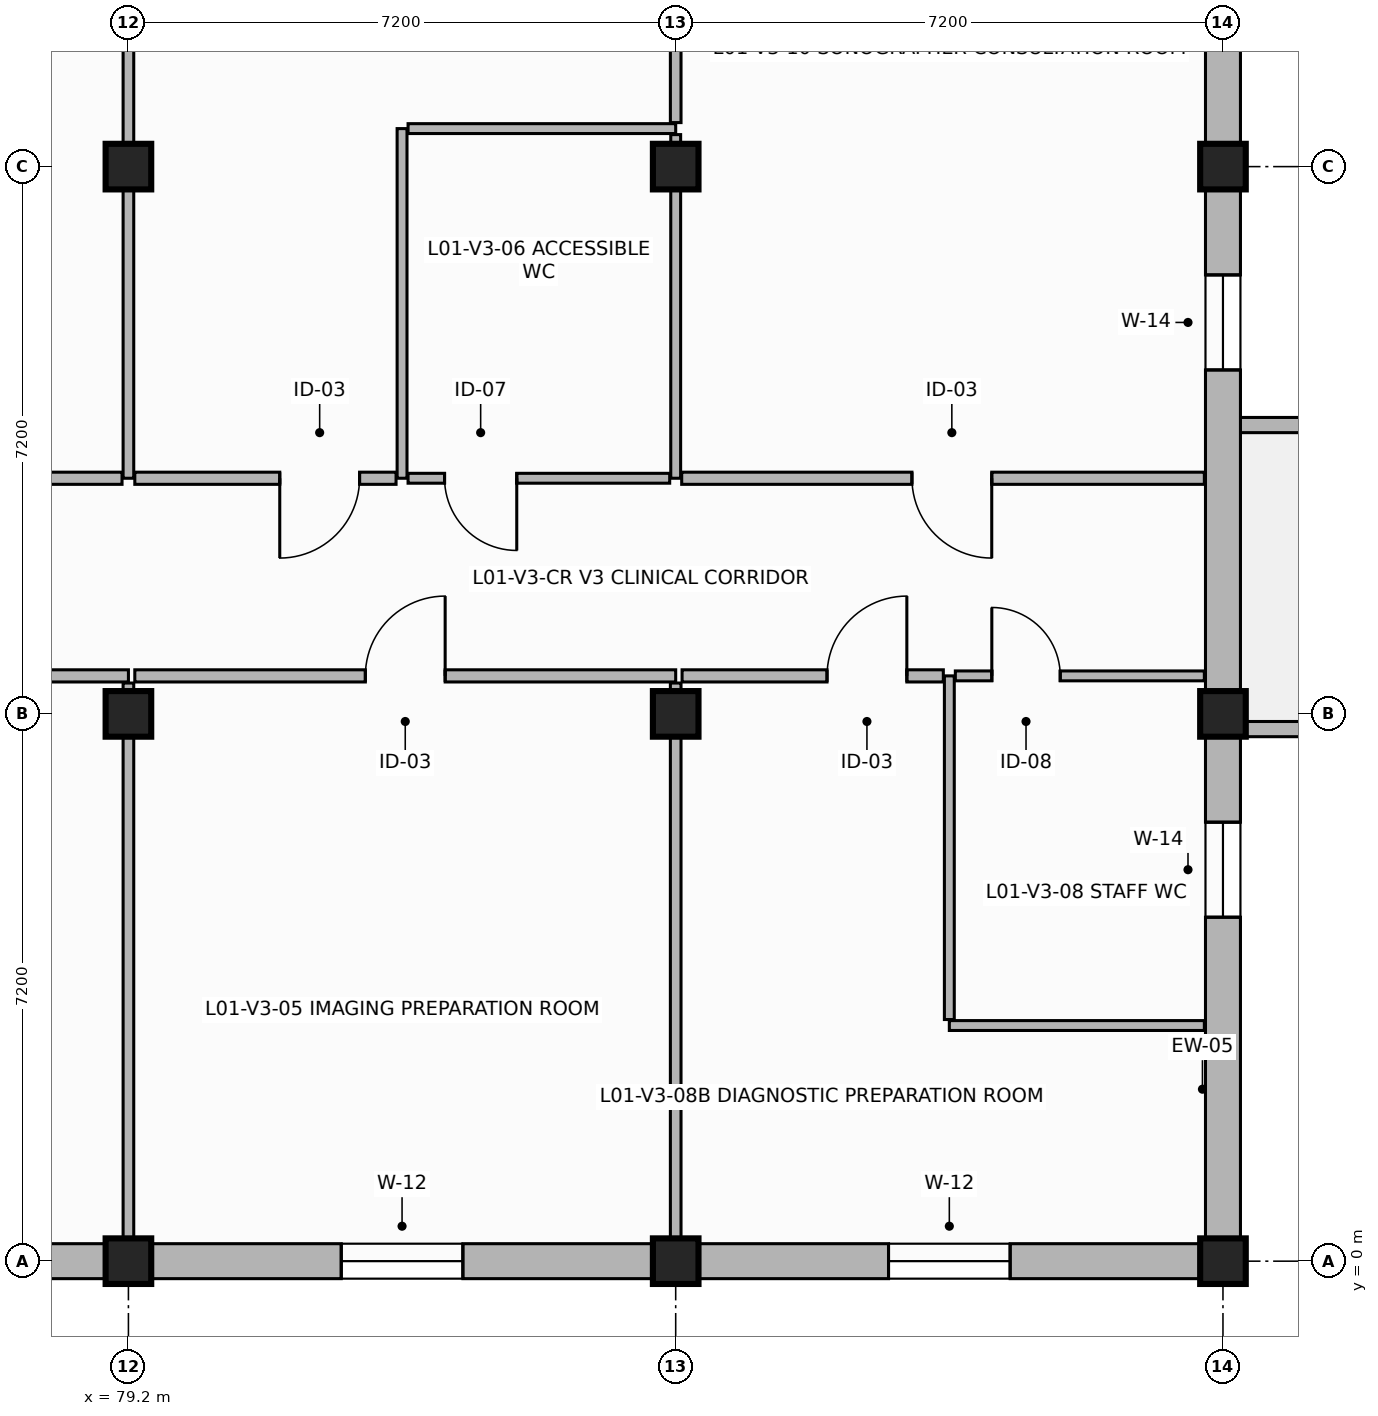
"""IFC4 building model, lengths in metres.
Left out: names, types, materials, properties, quantities, classifications, styles, units other than length and angle.
Written with IfcOpenShell. Run it as: python <this file> out.ifc"""

import sys

from ifc_helpers import new_model, si_unit, direction, frame, frame_2d, origin, origin_2d, place, context, subcontext, project, spatial, rectangle, extrude, element, fill, save


model = new_model("IFC4")
c1 = context("Model", 3, precision=1e-05, world=origin(), true_north=direction((0.0, 1.0)))
c2 = subcontext(c1, "Body", "Model", "MODEL_VIEW")
j1 = project(units=[si_unit("LENGTHUNIT", "METRE"), si_unit("PLANEANGLEUNIT", "RADIAN")], contexts=[c1])
p1 = place(None, origin())
s1 = spatial("IfcSite", under=j1, at=p1, CompositionType="ELEMENT")
p2 = place(p1, origin())
s2 = spatial("IfcBuilding", under=s1, at=p2, CompositionType="ELEMENT")
p3 = place(p2, frame((0.0, 0.0, 4.5)))
s3 = spatial("IfcBuildingStorey", under=s2, at=p3, CompositionType="ELEMENT", Elevation=4.5)
for number, where, z_axis, x_axis in (
    (1, (79.2, 0.0, 0.0), (0.0, 0.0, 1.0), (1.0, 0.0, 0.0)),
    (2, (79.2, 7.2, 0.0), (0.0, 0.0, 1.0), (1.0, 0.0, 0.0)),
    (3, (79.2, 14.4, 0.0), (0.0, 0.0, 1.0), (1.0, 0.0, 0.0)),
    (4, (86.4, 0.0, 0.0), (0.0, 0.0, 1.0), (1.0, 0.0, 0.0)),
    (5, (86.4, 7.2, 0.0), (0.0, 0.0, 1.0), (1.0, 0.0, 0.0)),
    (6, (86.4, 14.4, 0.0), (0.0, 0.0, 1.0), (1.0, 0.0, 0.0)),
    (7, (93.6, 0.0, 0.0), (0.0, 0.0, 1.0), (1.0, 0.0, 0.0)),
    (8, (93.6, 7.2, 0.0), (0.0, 0.0, 1.0), (1.0, 0.0, 0.0)),
    (9, (93.6, 14.4, 0.0), (0.0, 0.0, 1.0), (1.0, 0.0, 0.0)),
):
    element("IfcColumn", number, at=place(p3, frame(where, z_axis=z_axis, x_axis=x_axis)), inside=s3, PredefinedType="COLUMN", context=c2, shape_type="SweptSolid", body=[
        extrude(rectangle(XDim=0.6, YDim=0.6, at=origin_2d()), origin(), (0.0, 0.0, 1.0), 3.55),
    ])
for number, where, z_axis, x_axis in (
    (10, (93.72, 7.0, 0.0), (0.0, 0.0, 1.0), (1.0, 0.0, 0.0)),
    (11, (122.28, 11.0, 0.0), (0.0, 0.0, 1.0), (-1.0, 0.0, 0.0)),
):
    element("IfcWall", number, at=place(p3, frame(where, z_axis=z_axis, x_axis=x_axis)), inside=s3, PredefinedType="PARAPET", context=c2, shape_type="SweptSolid", body=[
        extrude(rectangle(XDim=28.56, YDim=0.2, at=frame_2d((14.28, 0.0))), origin(), (0.0, 0.0, 1.0), 0.95),
    ])
p4 = place(p3, frame((72.0, 0.0, 0.0), z_axis=(0.0, 0.0, 1.0), x_axis=(1.0, 0.0, 0.0)))
e12 = element("IfcWall", 12, at=p4, inside=s3, PredefinedType="SOLIDWALL", context=c2, shape_type="SweptSolid", body=[
    extrude(rectangle(XDim=7.2, YDim=0.46, at=frame_2d((3.6, 0.0))), origin(), (0.0, 0.0, 1.0), 2.83),
])
p5 = place(p4, frame((2.8, 0.0, 1.2)))
e13 = element("IfcOpeningElement", 13, at=p5, cuts=e12, PredefinedType="OPENING", context=c2, shape_type="SweptSolid", body=[
    extrude(rectangle(XDim=1.6, YDim=1.4, at=frame_2d((0.8, 0.7))), frame((0.0, 0.24, 0.0), z_axis=(0.0, -1.0, 0.0), x_axis=(1.0, 0.0, 0.0)), (0.0, 0.0, 1.0), 0.48),
])
p6 = place(p3, frame((79.2, 0.0, 0.0), z_axis=(0.0, 0.0, 1.0), x_axis=(1.0, 0.0, 0.0)))
e14 = element("IfcWall", 14, at=p6, inside=s3, PredefinedType="SOLIDWALL", context=c2, shape_type="SweptSolid", body=[
    extrude(rectangle(XDim=7.2, YDim=0.46, at=frame_2d((3.6, 0.0))), origin(), (0.0, 0.0, 1.0), 2.83),
])
p7 = place(p6, frame((2.8, 0.0, 1.2)))
e15 = element("IfcOpeningElement", 15, at=p7, cuts=e14, PredefinedType="OPENING", context=c2, shape_type="SweptSolid", body=[
    extrude(rectangle(XDim=1.6, YDim=1.4, at=frame_2d((0.8, 0.7))), frame((0.0, 0.24, 0.0), z_axis=(0.0, -1.0, 0.0), x_axis=(1.0, 0.0, 0.0)), (0.0, 0.0, 1.0), 0.48),
])
p8 = place(p3, frame((86.4, 0.0, 0.0), z_axis=(0.0, 0.0, 1.0), x_axis=(1.0, 0.0, 0.0)))
e16 = element("IfcWall", 16, at=p8, inside=s3, PredefinedType="SOLIDWALL", context=c2, shape_type="SweptSolid", body=[
    extrude(rectangle(XDim=7.2, YDim=0.46, at=frame_2d((3.6, 0.0))), origin(), (0.0, 0.0, 1.0), 2.83),
])
p9 = place(p8, frame((2.8, 0.0, 1.2)))
e17 = element("IfcOpeningElement", 17, at=p9, cuts=e16, PredefinedType="OPENING", context=c2, shape_type="SweptSolid", body=[
    extrude(rectangle(XDim=1.6, YDim=1.4, at=frame_2d((0.8, 0.7))), frame((0.0, 0.24, 0.0), z_axis=(0.0, -1.0, 0.0), x_axis=(1.0, 0.0, 0.0)), (0.0, 0.0, 1.0), 0.48),
])
p10 = place(p3, frame((93.6, 0.0, 0.0), z_axis=(0.0, 0.0, 1.0), x_axis=(0.0, 1.0, 0.0)))
e18 = element("IfcWall", 18, at=p10, inside=s3, PredefinedType="SOLIDWALL", context=c2, shape_type="SweptSolid", body=[
    extrude(rectangle(XDim=7.2, YDim=0.46, at=frame_2d((3.6, 0.0))), origin(), (0.0, 0.0, 1.0), 2.83),
])
p11 = place(p10, frame((4.525, 0.0, 1.2)))
e19 = element("IfcOpeningElement", 19, at=p11, cuts=e18, PredefinedType="OPENING", context=c2, shape_type="SweptSolid", body=[
    extrude(rectangle(XDim=1.25, YDim=1.35, at=frame_2d((0.625, 0.675))), frame((0.0, 0.24, 0.0), z_axis=(0.0, -1.0, 0.0), x_axis=(1.0, 0.0, 0.0)), (0.0, 0.0, 1.0), 0.48),
])
p12 = place(p3, frame((93.6, 7.2, 0.0), z_axis=(0.0, 0.0, 1.0), x_axis=(0.0, 1.0, 0.0)))
e20 = element("IfcWall", 20, at=p12, inside=s3, PredefinedType="SOLIDWALL", context=c2, shape_type="SweptSolid", body=[
    extrude(rectangle(XDim=7.2, YDim=0.46, at=frame_2d((3.6, 0.0))), origin(), (0.0, 0.0, 1.0), 2.83),
])
p13 = place(p12, frame((4.525, 0.0, 1.2)))
e21 = element("IfcOpeningElement", 21, at=p13, cuts=e20, PredefinedType="OPENING", context=c2, shape_type="SweptSolid", body=[
    extrude(rectangle(XDim=1.25, YDim=1.35, at=frame_2d((0.625, 0.675))), frame((0.0, 0.24, 0.0), z_axis=(0.0, -1.0, 0.0), x_axis=(1.0, 0.0, 0.0)), (0.0, 0.0, 1.0), 0.48),
])
p14 = place(p3, frame((93.6, 14.4, 0.0), z_axis=(0.0, 0.0, 1.0), x_axis=(0.0, 1.0, 0.0)))
e22 = element("IfcWall", 22, at=p14, inside=s3, PredefinedType="SOLIDWALL", context=c2, shape_type="SweptSolid", body=[
    extrude(rectangle(XDim=7.2, YDim=0.46, at=frame_2d((3.6, 0.0))), origin(), (0.0, 0.0, 1.0), 2.83),
])
p15 = place(p14, frame((2.975, 0.0, 1.2)))
e23 = element("IfcOpeningElement", 23, at=p15, cuts=e22, PredefinedType="OPENING", context=c2, shape_type="SweptSolid", body=[
    extrude(rectangle(XDim=1.25, YDim=1.35, at=frame_2d((0.625, 0.675))), frame((0.0, 0.24, 0.0), z_axis=(0.0, -1.0, 0.0), x_axis=(1.0, 0.0, 0.0)), (0.0, 0.0, 1.0), 0.48),
])
p16 = place(p3, frame((64.929, 7.7, 0.0), z_axis=(0.0, 0.0, 1.0), x_axis=(1.0, 0.0, 0.0)))
e24 = element("IfcWall", 24, at=p16, inside=s3, PredefinedType="PARTITIONING", context=c2, shape_type="SweptSolid", body=[
    extrude(rectangle(XDim=14.271, YDim=0.16, at=frame_2d((7.135, 0.0))), origin(), (0.0, 0.0, 1.0), 2.81),
])
p17 = place(p16, frame((10.136, 0.0, 0.0)))
e25 = element("IfcOpeningElement", 25, at=p17, cuts=e24, PredefinedType="OPENING", context=c2, shape_type="SweptSolid", body=[
    extrude(rectangle(XDim=1.0, YDim=2.15, at=frame_2d((0.5, 1.075))), frame((0.0, 0.09, 0.0), z_axis=(0.0, -1.0, 0.0), x_axis=(1.0, 0.0, 0.0)), (0.0, 0.0, 1.0), 0.18),
])
p18 = place(p3, frame((79.2, 7.606, 0.0), z_axis=(0.0, 0.0, 1.0), x_axis=(0.0, -1.0, 0.0)))
e26 = element("IfcWall", 26, at=p18, inside=s3, PredefinedType="PARTITIONING", context=c2, shape_type="SweptSolid", body=[
    extrude(rectangle(XDim=7.361, YDim=0.14, at=frame_2d((3.68, 0.0))), origin(), (0.0, 0.0, 1.0), 2.81),
])
p19 = place(p3, frame((79.2, 21.355, 0.0), z_axis=(0.0, 0.0, 1.0), x_axis=(0.0, -1.0, 0.0)))
e27 = element("IfcWall", 27, at=p19, inside=s3, PredefinedType="PARTITIONING", context=c2, shape_type="SweptSolid", body=[
    extrude(rectangle(XDim=11.055, YDim=0.14, at=frame_2d((5.527, 0.0))), origin(), (0.0, 0.0, 1.0), 2.81),
])
p20 = place(p3, frame((79.116, 10.3, 0.0), z_axis=(0.0, 0.0, 1.0), x_axis=(-1.0, 0.0, 0.0)))
e28 = element("IfcWall", 28, at=p20, inside=s3, PredefinedType="PARTITIONING", context=c2, shape_type="SweptSolid", body=[
    extrude(rectangle(XDim=14.316, YDim=0.16, at=frame_2d((7.158, 0.0))), origin(), (0.0, 0.0, 1.0), 2.81),
])
p21 = place(p20, frame((10.171, 0.0, 0.0)))
e29 = element("IfcOpeningElement", 29, at=p21, cuts=e28, PredefinedType="OPENING", context=c2, shape_type="SweptSolid", body=[
    extrude(rectangle(XDim=1.0, YDim=2.15, at=frame_2d((0.5, 1.075))), frame((0.0, 0.09, 0.0), z_axis=(0.0, -1.0, 0.0), x_axis=(1.0, 0.0, 0.0)), (0.0, 0.0, 1.0), 0.18),
])
p22 = place(p3, frame((79.284, 7.7, 0.0), z_axis=(0.0, 0.0, 1.0), x_axis=(1.0, 0.0, 0.0)))
e30 = element("IfcWall", 30, at=p22, inside=s3, PredefinedType="PARTITIONING", context=c2, shape_type="SweptSolid", body=[
    extrude(rectangle(XDim=7.116, YDim=0.16, at=frame_2d((3.558, 0.0))), origin(), (0.0, 0.0, 1.0), 2.81),
])
p23 = place(p22, frame((3.033, 0.0, 0.0)))
e31 = element("IfcOpeningElement", 31, at=p23, cuts=e30, PredefinedType="OPENING", context=c2, shape_type="SweptSolid", body=[
    extrude(rectangle(XDim=1.05, YDim=2.15, at=frame_2d((0.525, 1.075))), frame((0.0, 0.09, 0.0), z_axis=(0.0, -1.0, 0.0), x_axis=(1.0, 0.0, 0.0)), (0.0, 0.0, 1.0), 0.18),
])
p24 = place(p3, frame((86.4, 7.606, 0.0), z_axis=(0.0, 0.0, 1.0), x_axis=(0.0, -1.0, 0.0)))
e32 = element("IfcWall", 32, at=p24, inside=s3, PredefinedType="PARTITIONING", context=c2, shape_type="SweptSolid", body=[
    extrude(rectangle(XDim=7.361, YDim=0.14, at=frame_2d((3.68, 0.0))), origin(), (0.0, 0.0, 1.0), 2.81),
])
p25 = place(p3, frame((82.8, 10.3, 0.0), z_axis=(0.0, 0.0, 1.0), x_axis=(0.0, 1.0, 0.0)))
e33 = element("IfcWall", 33, at=p25, inside=s3, PredefinedType="PARTITIONING", context=c2, shape_type="SweptSolid", body=[
    extrude(rectangle(XDim=4.6, YDim=0.13, at=frame_2d((2.3, 0.0))), origin(), (0.0, 0.0, 1.0), 2.81),
])
p26 = place(p3, frame((82.879, 14.9, 0.0), z_axis=(0.0, 0.0, 1.0), x_axis=(1.0, 0.0, 0.0)))
e34 = element("IfcWall", 34, at=p26, inside=s3, PredefinedType="PARTITIONING", context=c2, shape_type="SweptSolid", body=[
    extrude(rectangle(XDim=3.521, YDim=0.13, at=frame_2d((1.76, 0.0))), origin(), (0.0, 0.0, 1.0), 2.81),
])
p27 = place(p3, frame((86.4, 14.821, 0.0), z_axis=(0.0, 0.0, 1.0), x_axis=(0.0, -1.0, 0.0)))
e35 = element("IfcWall", 35, at=p27, inside=s3, PredefinedType="PARTITIONING", context=c2, shape_type="SweptSolid", body=[
    extrude(rectangle(XDim=4.521, YDim=0.13, at=frame_2d((2.26, 0.0))), origin(), (0.0, 0.0, 1.0), 2.81),
])
p28 = place(p3, frame((86.321, 10.3, 0.0), z_axis=(0.0, 0.0, 1.0), x_axis=(-1.0, 0.0, 0.0)))
e36 = element("IfcWall", 36, at=p28, inside=s3, PredefinedType="PARTITIONING", context=c2, shape_type="SweptSolid", body=[
    extrude(rectangle(XDim=3.442, YDim=0.13, at=frame_2d((1.721, 0.0))), origin(), (0.0, 0.0, 1.0), 2.81),
])
p29 = place(p28, frame((2.012, 0.0, 0.0)))
e37 = element("IfcOpeningElement", 37, at=p29, cuts=e36, PredefinedType="OPENING", context=c2, shape_type="SweptSolid", body=[
    extrude(rectangle(XDim=0.95, YDim=2.1, at=frame_2d((0.475, 1.05))), frame((0.0, 0.075, 0.0), z_axis=(0.0, -1.0, 0.0), x_axis=(1.0, 0.0, 0.0)), (0.0, 0.0, 1.0), 0.15),
])
p30 = place(p3, frame((82.721, 10.3, 0.0), z_axis=(0.0, 0.0, 1.0), x_axis=(-1.0, 0.0, 0.0)))
e38 = element("IfcWall", 38, at=p30, inside=s3, PredefinedType="PARTITIONING", context=c2, shape_type="SweptSolid", body=[
    extrude(rectangle(XDim=3.437, YDim=0.16, at=frame_2d((1.719, 0.0))), origin(), (0.0, 0.0, 1.0), 2.81),
])
p31 = place(p30, frame((0.48, 0.0, 0.0)))
e39 = element("IfcOpeningElement", 39, at=p31, cuts=e38, PredefinedType="OPENING", context=c2, shape_type="SweptSolid", body=[
    extrude(rectangle(XDim=1.05, YDim=2.15, at=frame_2d((0.525, 1.075))), frame((0.0, 0.09, 0.0), z_axis=(0.0, -1.0, 0.0), x_axis=(1.0, 0.0, 0.0)), (0.0, 0.0, 1.0), 0.18),
])
p32 = place(p3, frame((86.4, 21.355, 0.0), z_axis=(0.0, 0.0, 1.0), x_axis=(0.0, -1.0, 0.0)))
e40 = element("IfcWall", 40, at=p32, inside=s3, PredefinedType="PARTITIONING", context=c2, shape_type="SweptSolid", body=[
    extrude(rectangle(XDim=6.376, YDim=0.14, at=frame_2d((3.188, 0.0))), origin(), (0.0, 0.0, 1.0), 2.81),
])
p33 = place(p3, frame((93.355, 3.1, 0.0), z_axis=(0.0, 0.0, 1.0), x_axis=(-1.0, 0.0, 0.0)))
e41 = element("IfcWall", 41, at=p33, inside=s3, PredefinedType="PARTITIONING", context=c2, shape_type="SweptSolid", body=[
    extrude(rectangle(XDim=3.355, YDim=0.13, at=frame_2d((1.677, 0.0))), origin(), (0.0, 0.0, 1.0), 2.81),
])
p34 = place(p3, frame((90.0, 3.179, 0.0), z_axis=(0.0, 0.0, 1.0), x_axis=(0.0, 1.0, 0.0)))
e42 = element("IfcWall", 42, at=p34, inside=s3, PredefinedType="PARTITIONING", context=c2, shape_type="SweptSolid", body=[
    extrude(rectangle(XDim=4.521, YDim=0.13, at=frame_2d((2.26, 0.0))), origin(), (0.0, 0.0, 1.0), 2.81),
])
p35 = place(p3, frame((90.079, 7.7, 0.0), z_axis=(0.0, 0.0, 1.0), x_axis=(1.0, 0.0, 0.0)))
e43 = element("IfcWall", 43, at=p35, inside=s3, PredefinedType="PARTITIONING", context=c2, shape_type="SweptSolid", body=[
    extrude(rectangle(XDim=3.276, YDim=0.13, at=frame_2d((1.638, 0.0))), origin(), (0.0, 0.0, 1.0), 2.81),
])
p36 = place(p35, frame((0.48, 0.0, 0.0)))
e44 = element("IfcOpeningElement", 44, at=p36, cuts=e43, PredefinedType="OPENING", context=c2, shape_type="SweptSolid", body=[
    extrude(rectangle(XDim=0.9, YDim=2.1, at=frame_2d((0.45, 1.05))), frame((0.0, 0.075, 0.0), z_axis=(0.0, -1.0, 0.0), x_axis=(1.0, 0.0, 0.0)), (0.0, 0.0, 1.0), 0.15),
])
p37 = place(p3, frame((86.484, 7.7, 0.0), z_axis=(0.0, 0.0, 1.0), x_axis=(1.0, 0.0, 0.0)))
e45 = element("IfcWall", 45, at=p37, inside=s3, PredefinedType="PARTITIONING", context=c2, shape_type="SweptSolid", body=[
    extrude(rectangle(XDim=3.437, YDim=0.16, at=frame_2d((1.719, 0.0))), origin(), (0.0, 0.0, 1.0), 2.81),
])
p38 = place(p37, frame((1.907, 0.0, 0.0)))
e46 = element("IfcOpeningElement", 46, at=p38, cuts=e45, PredefinedType="OPENING", context=c2, shape_type="SweptSolid", body=[
    extrude(rectangle(XDim=1.05, YDim=2.15, at=frame_2d((0.525, 1.075))), frame((0.0, 0.09, 0.0), z_axis=(0.0, -1.0, 0.0), x_axis=(1.0, 0.0, 0.0)), (0.0, 0.0, 1.0), 0.18),
])
p39 = place(p3, frame((93.355, 10.3, 0.0), z_axis=(0.0, 0.0, 1.0), x_axis=(-1.0, 0.0, 0.0)))
e47 = element("IfcWall", 47, at=p39, inside=s3, PredefinedType="PARTITIONING", context=c2, shape_type="SweptSolid", body=[
    extrude(rectangle(XDim=6.876, YDim=0.16, at=frame_2d((3.438, 0.0))), origin(), (0.0, 0.0, 1.0), 2.81),
])
p40 = place(p39, frame((2.797, 0.0, 0.0)))
e48 = element("IfcOpeningElement", 48, at=p40, cuts=e47, PredefinedType="OPENING", context=c2, shape_type="SweptSolid", body=[
    extrude(rectangle(XDim=1.05, YDim=2.15, at=frame_2d((0.525, 1.075))), frame((0.0, 0.09, 0.0), z_axis=(0.0, -1.0, 0.0), x_axis=(1.0, 0.0, 0.0)), (0.0, 0.0, 1.0), 0.18),
])
p41 = place(p7, origin())
e49 = element("IfcWindow", 49, at=p41, inside=s3, PartitioningType="SINGLE_PANEL", PredefinedType="WINDOW", context=c2, shape_type="SweptSolid", body=[
    extrude(rectangle(XDim=1.6, YDim=1.4, at=frame_2d((0.8, 0.7))), frame((0.0, 0.03, 0.0), z_axis=(0.0, -1.0, 0.0), x_axis=(1.0, 0.0, 0.0)), (0.0, 0.0, 1.0), 0.06),
])
fill(e15, e49)
p42 = place(p9, origin())
e50 = element("IfcWindow", 50, at=p42, inside=s3, PartitioningType="SINGLE_PANEL", PredefinedType="WINDOW", context=c2, shape_type="SweptSolid", body=[
    extrude(rectangle(XDim=1.6, YDim=1.4, at=frame_2d((0.8, 0.7))), frame((0.0, 0.03, 0.0), z_axis=(0.0, -1.0, 0.0), x_axis=(1.0, 0.0, 0.0)), (0.0, 0.0, 1.0), 0.06),
])
fill(e17, e50)
p43 = place(p11, origin())
e51 = element("IfcWindow", 51, at=p43, inside=s3, PartitioningType="SINGLE_PANEL", PredefinedType="WINDOW", context=c2, shape_type="SweptSolid", body=[
    extrude(rectangle(XDim=1.25, YDim=1.35, at=frame_2d((0.625, 0.675))), frame((0.0, 0.03, 0.0), z_axis=(0.0, -1.0, 0.0), x_axis=(1.0, 0.0, 0.0)), (0.0, 0.0, 1.0), 0.06),
])
fill(e19, e51)
p44 = place(p13, origin())
e52 = element("IfcWindow", 52, at=p44, inside=s3, PartitioningType="SINGLE_PANEL", PredefinedType="WINDOW", context=c2, shape_type="SweptSolid", body=[
    extrude(rectangle(XDim=1.25, YDim=1.35, at=frame_2d((0.625, 0.675))), frame((0.0, 0.03, 0.0), z_axis=(0.0, -1.0, 0.0), x_axis=(1.0, 0.0, 0.0)), (0.0, 0.0, 1.0), 0.06),
])
fill(e21, e52)
p45 = place(p23, origin())
e53 = element("IfcDoor", 53, at=p45, inside=s3, OperationType="SINGLE_SWING_RIGHT", PredefinedType="DOOR", context=c2, shape_type="SweptSolid", body=[
    extrude(rectangle(XDim=1.05, YDim=2.15, at=frame_2d((0.525, 1.075))), frame((0.0, 0.025, 0.0), z_axis=(0.0, -1.0, 0.0), x_axis=(1.0, 0.0, 0.0)), (0.0, 0.0, 1.0), 0.05),
])
fill(e31, e53)
p46 = place(p29, origin())
e54 = element("IfcDoor", 54, at=p46, inside=s3, OperationType="SINGLE_SWING_LEFT", PredefinedType="DOOR", context=c2, shape_type="SweptSolid", body=[
    extrude(rectangle(XDim=0.95, YDim=2.1, at=frame_2d((0.475, 1.05))), frame((0.0, 0.025, 0.0), z_axis=(0.0, -1.0, 0.0), x_axis=(1.0, 0.0, 0.0)), (0.0, 0.0, 1.0), 0.05),
])
fill(e37, e54)
p47 = place(p31, origin())
e55 = element("IfcDoor", 55, at=p47, inside=s3, OperationType="SINGLE_SWING_RIGHT", PredefinedType="DOOR", context=c2, shape_type="SweptSolid", body=[
    extrude(rectangle(XDim=1.05, YDim=2.15, at=frame_2d((0.525, 1.075))), frame((0.0, 0.025, 0.0), z_axis=(0.0, -1.0, 0.0), x_axis=(1.0, 0.0, 0.0)), (0.0, 0.0, 1.0), 0.05),
])
fill(e39, e55)
p48 = place(p36, origin())
e56 = element("IfcDoor", 56, at=p48, inside=s3, OperationType="SINGLE_SWING_LEFT", PredefinedType="DOOR", context=c2, shape_type="SweptSolid", body=[
    extrude(rectangle(XDim=0.9, YDim=2.1, at=frame_2d((0.45, 1.05))), frame((0.0, 0.025, 0.0), z_axis=(0.0, -1.0, 0.0), x_axis=(1.0, 0.0, 0.0)), (0.0, 0.0, 1.0), 0.05),
])
fill(e44, e56)
p49 = place(p38, origin())
e57 = element("IfcDoor", 57, at=p49, inside=s3, OperationType="SINGLE_SWING_RIGHT", PredefinedType="DOOR", context=c2, shape_type="SweptSolid", body=[
    extrude(rectangle(XDim=1.05, YDim=2.15, at=frame_2d((0.525, 1.075))), frame((0.0, 0.025, 0.0), z_axis=(0.0, -1.0, 0.0), x_axis=(1.0, 0.0, 0.0)), (0.0, 0.0, 1.0), 0.05),
])
fill(e46, e57)
p50 = place(p40, origin())
e58 = element("IfcDoor", 58, at=p50, inside=s3, OperationType="SINGLE_SWING_LEFT", PredefinedType="DOOR", context=c2, shape_type="SweptSolid", body=[
    extrude(rectangle(XDim=1.05, YDim=2.15, at=frame_2d((0.525, 1.075))), frame((0.0, 0.025, 0.0), z_axis=(0.0, -1.0, 0.0), x_axis=(1.0, 0.0, 0.0)), (0.0, 0.0, 1.0), 0.05),
])
fill(e48, e58)
save(model, sys.argv[1])
